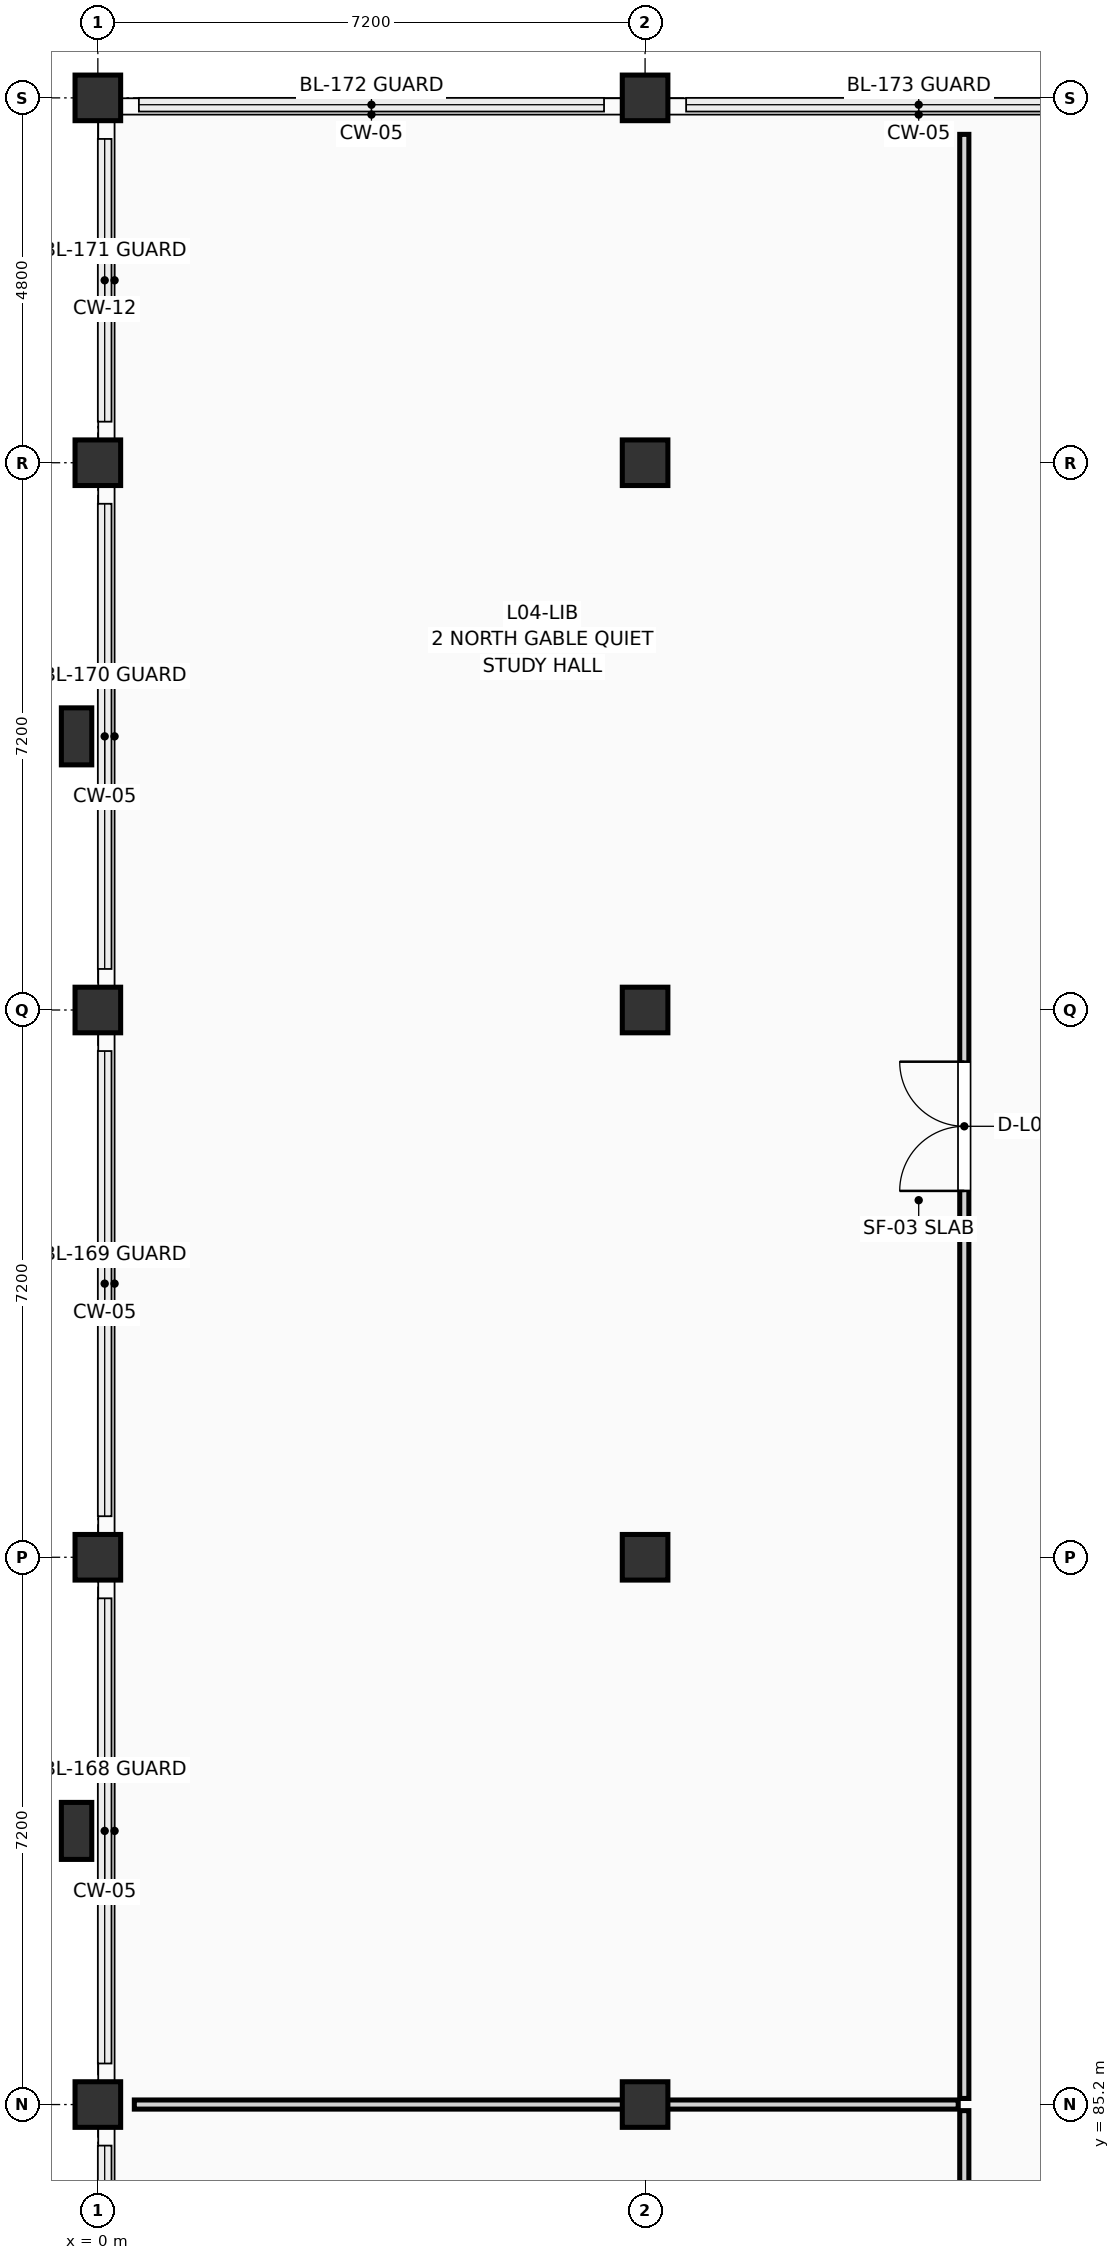
"""IFC4 building model, lengths in metres.
Left out: names, types, materials, properties, quantities, classifications, styles, units other than length and angle.
Written with IfcOpenShell. Run it as: python <this file> out.ifc"""

import sys

from ifc_helpers import new_model, si_unit, direction, frame, frame_2d, origin, origin_2d, place, context, subcontext, project, spatial, rectangle, extrude, element, fill, save


model = new_model("IFC4")
c1 = context("Model", 3, precision=1e-05, world=origin(), true_north=direction((0.0, 1.0)))
c2 = subcontext(c1, "Body", "Model", "MODEL_VIEW")
j1 = project(units=[si_unit("LENGTHUNIT", "METRE"), si_unit("PLANEANGLEUNIT", "RADIAN")], contexts=[c1])
p1 = place(None, origin())
s1 = spatial("IfcSite", under=j1, at=p1, CompositionType="ELEMENT")
p2 = place(p1, origin())
s2 = spatial("IfcBuilding", under=s1, at=p2, CompositionType="ELEMENT")
p3 = place(p2, frame((0.0, 0.0, 15.75)))
s3 = spatial("IfcBuildingStorey", under=s2, at=p3, CompositionType="ELEMENT", Elevation=15.75)
for number, where, z_axis, x_axis in (
    (1, (0.0, 85.2, 0.0), (0.0, 0.0, 1.0), (1.0, 0.0, 0.0)),
    (2, (0.0, 92.4, 0.0), (0.0, 0.0, 1.0), (1.0, 0.0, 0.0)),
    (3, (0.0, 99.6, 0.0), (0.0, 0.0, 1.0), (1.0, 0.0, 0.0)),
    (4, (0.0, 106.8, 0.0), (0.0, 0.0, 1.0), (1.0, 0.0, 0.0)),
    (5, (0.0, 111.6, 0.0), (0.0, 0.0, 1.0), (1.0, 0.0, 0.0)),
    (6, (7.2, 85.2, 0.0), (0.0, 0.0, 1.0), (1.0, 0.0, 0.0)),
    (7, (7.2, 92.4, 0.0), (0.0, 0.0, 1.0), (1.0, 0.0, 0.0)),
    (8, (7.2, 99.6, 0.0), (0.0, 0.0, 1.0), (1.0, 0.0, 0.0)),
    (9, (7.2, 106.8, 0.0), (0.0, 0.0, 1.0), (1.0, 0.0, 0.0)),
    (10, (7.2, 111.6, 0.0), (0.0, 0.0, 1.0), (1.0, 0.0, 0.0)),
):
    element("IfcColumn", number, at=place(p3, frame(where, z_axis=z_axis, x_axis=x_axis)), inside=s3, PredefinedType="COLUMN", context=c2, shape_type="SweptSolid", body=[
        extrude(rectangle(XDim=0.6, YDim=0.6, at=origin_2d()), origin(), (0.0, 0.0, 1.0), 3.6),
    ])
for number, where, z_axis, x_axis in (
    (11, (-0.28, 88.8, 0.0), (0.0, 0.0, 1.0), (1.0, 0.0, 0.0)),
    (12, (-0.28, 103.2, 0.0), (0.0, 0.0, 1.0), (1.0, 0.0, 0.0)),
):
    element("IfcColumn", number, at=place(p3, frame(where, z_axis=z_axis, x_axis=x_axis)), inside=s3, PredefinedType="PILASTER", context=c2, shape_type="SweptSolid", body=[
        extrude(rectangle(XDim=0.4, YDim=0.75, at=origin_2d()), origin(), (0.0, 0.0, 1.0), 3.6),
    ])
p4 = place(p3, frame((11.4, 56.68, 0.0), z_axis=(0.0, 0.0, 1.0), x_axis=(0.0, 1.0, 0.0)))
e13 = element("IfcWall", 13, at=p4, inside=s3, PredefinedType="PARTITIONING", context=c2, shape_type="SweptSolid", body=[
    extrude(rectangle(XDim=28.44, YDim=0.12, at=frame_2d((14.22, 0.0))), origin(), (0.0, 0.0, 1.0), 3.375),
])
p5 = place(p4, frame((13.37, 0.0, 0.0)))
e14 = element("IfcOpeningElement", 14, at=p5, cuts=e13, PredefinedType="OPENING", context=c2, shape_type="SweptSolid", body=[
    extrude(rectangle(XDim=1.7, YDim=2.28, at=frame_2d((0.85, 1.14))), frame((0.0, 0.072, 0.0), z_axis=(0.0, -1.0, 0.0), x_axis=(1.0, 0.0, 0.0)), (0.0, 0.0, 1.0), 0.144),
])
p6 = place(p3, frame((0.48, 85.2, 0.0), z_axis=(0.0, 0.0, 1.0), x_axis=(1.0, 0.0, 0.0)))
e15 = element("IfcWall", 15, at=p6, inside=s3, PredefinedType="PARTITIONING", context=c2, shape_type="SweptSolid", body=[
    extrude(rectangle(XDim=10.84, YDim=0.12, at=frame_2d((5.42, 0.0))), origin(), (0.0, 0.0, 1.0), 2.655),
])
p7 = place(p3, frame((11.4, 85.28, 0.0), z_axis=(0.0, 0.0, 1.0), x_axis=(0.0, 1.0, 0.0)))
e16 = element("IfcWall", 16, at=p7, inside=s3, PredefinedType="PARTITIONING", context=c2, shape_type="SweptSolid", body=[
    extrude(rectangle(XDim=25.84, YDim=0.12, at=frame_2d((12.92, 0.0))), origin(), (0.0, 0.0, 1.0), 3.375),
])
p8 = place(p7, frame((11.94, 0.0, 0.0)))
e17 = element("IfcOpeningElement", 17, at=p8, cuts=e16, PredefinedType="OPENING", context=c2, shape_type="SweptSolid", body=[
    extrude(rectangle(XDim=1.7, YDim=2.28, at=frame_2d((0.85, 1.14))), frame((0.0, 0.072, 0.0), z_axis=(0.0, -1.0, 0.0), x_axis=(1.0, 0.0, 0.0)), (0.0, 0.0, 1.0), 0.144),
])
p9 = place(p8, origin())
e18 = element("IfcDoor", 18, at=p9, inside=s3, OperationType="DOUBLE_DOOR_SINGLE_SWING", PredefinedType="DOOR", context=c2, shape_type="SweptSolid", body=[
    extrude(rectangle(XDim=1.7, YDim=2.28, at=frame_2d((0.85, 1.14))), frame((0.0, 0.025, 0.0), z_axis=(0.0, -1.0, 0.0), x_axis=(1.0, 0.0, 0.0)), (0.0, 0.0, 1.0), 0.05),
])
fill(e17, e18)
save(model, sys.argv[1])
